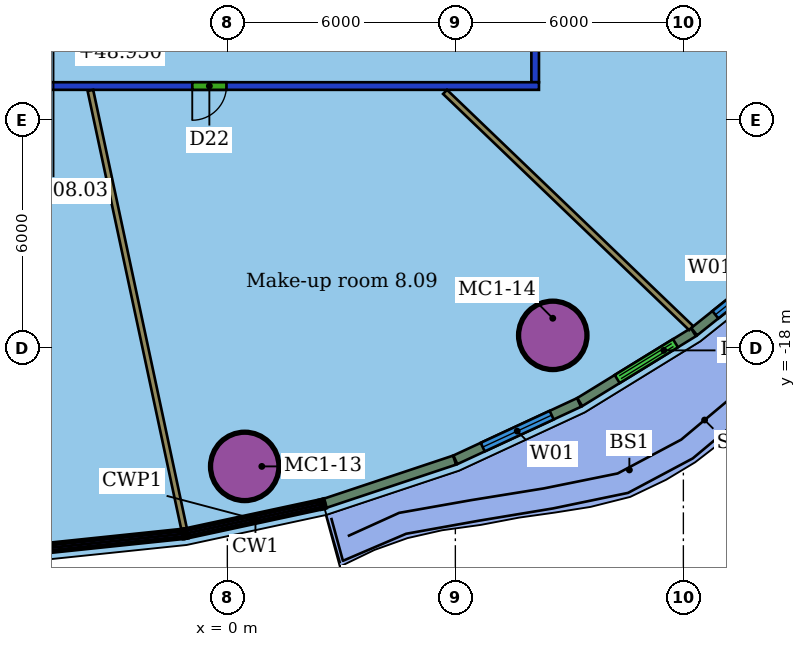
"""IFC4 building model, lengths in metres.
Left out: names, types, materials, properties, quantities, classifications, styles, units other than length and angle.
Written with IfcOpenShell. Run it as: python <this file> out.ifc"""

import sys

from ifc_helpers import new_model, si_unit, direction, frame, frame_2d, origin, origin_2d, place, context, subcontext, project, spatial, rectangle, hollow_circle, extrude, element, fill, save


model = new_model("IFC4")
c1 = context("Model", 3, precision=1e-05, world=origin(), true_north=direction((0.0, 1.0)))
c2 = subcontext(c1, "Body", "Model", "MODEL_VIEW")
j1 = project(units=[si_unit("LENGTHUNIT", "METRE"), si_unit("PLANEANGLEUNIT", "RADIAN")], contexts=[c1])
p1 = place(None, origin())
s1 = spatial("IfcSite", under=j1, at=p1, CompositionType="ELEMENT")
p2 = place(p1, origin())
s2 = spatial("IfcBuilding", under=s1, at=p2, CompositionType="ELEMENT")
p3 = place(p2, frame((0.0, 0.0, 47.1)))
s3 = spatial("IfcBuildingStorey", under=s2, at=p3, CompositionType="ELEMENT", Elevation=47.1)
for number, where, z_axis, x_axis in (
    (1, (0.458, -21.108, 0.0), (0.0, 0.0, 1.0), (1.0, 0.0, 0.0)),
    (2, (8.563, -17.66, 0.0), (0.0, 0.0, 1.0), (1.0, 0.0, 0.0)),
):
    element("IfcColumn", number, at=place(p3, frame(where, z_axis=z_axis, x_axis=x_axis)), inside=s3, PredefinedType="COLUMN", context=c2, shape_type="SweptSolid", body=[
        extrude(hollow_circle(Radius=0.9, WallThickness=0.06, at=origin_2d()), origin(), (0.0, 0.0, 1.0), 3.55),
    ])
p4 = place(p3, frame((8.2, -11.1, 0.0), z_axis=(0.0, 0.0, 1.0), x_axis=(-1.0, 0.0, 0.0)))
e3 = element("IfcWall", 3, at=p4, inside=s3, PredefinedType="PARTITIONING", context=c2, shape_type="SweptSolid", body=[
    extrude(rectangle(XDim=28.4, YDim=0.2, at=frame_2d((14.2, 0.0))), origin(), (0.0, 0.0, 1.0), 2.85),
])
p5 = place(p4, frame((25.038, 0.0, 0.0)))
e4 = element("IfcOpeningElement", 4, at=p5, cuts=e3, PredefinedType="OPENING", context=c2, shape_type="SweptSolid", body=[
    extrude(rectangle(XDim=1.0, YDim=2.1, at=frame_2d((0.5, 1.05))), frame((0.0, 0.11, 0.0), z_axis=(0.0, -1.0, 0.0), x_axis=(1.0, 0.0, 0.0)), (0.0, 0.0, 1.0), 0.22),
])
p6 = place(p4, frame((18.73, 0.0, 0.0)))
e5 = element("IfcOpeningElement", 5, at=p6, cuts=e3, PredefinedType="OPENING", context=c2, shape_type="SweptSolid", body=[
    extrude(rectangle(XDim=1.8, YDim=2.1, at=frame_2d((0.9, 1.05))), frame((0.0, 0.11, 0.0), z_axis=(0.0, -1.0, 0.0), x_axis=(1.0, 0.0, 0.0)), (0.0, 0.0, 1.0), 0.22),
])
p7 = place(p4, frame((8.223, 0.0, 0.0)))
e6 = element("IfcOpeningElement", 6, at=p7, cuts=e3, PredefinedType="OPENING", context=c2, shape_type="SweptSolid", body=[
    extrude(rectangle(XDim=0.9, YDim=2.1, at=frame_2d((0.45, 1.05))), frame((0.0, 0.11, 0.0), z_axis=(0.0, -1.0, 0.0), x_axis=(1.0, 0.0, 0.0)), (0.0, 0.0, 1.0), 0.22),
])
p8 = place(p3, frame((8.1, 11.0, 0.0), z_axis=(0.0, 0.0, 1.0), x_axis=(0.0, -1.0, 0.0)))
e7 = element("IfcWall", 7, at=p8, inside=s3, PredefinedType="PARTITIONING", context=c2, shape_type="SweptSolid", body=[
    extrude(rectangle(XDim=22.0, YDim=0.2, at=frame_2d((11.0, 0.0))), origin(), (0.0, 0.0, 1.0), 2.85),
])
p9 = place(p8, frame((2.753, 0.0, 0.0)))
e8 = element("IfcOpeningElement", 8, at=p9, cuts=e7, PredefinedType="OPENING", context=c2, shape_type="SweptSolid", body=[
    extrude(rectangle(XDim=1.1, YDim=2.1, at=frame_2d((0.55, 1.05))), frame((0.0, 0.11, 0.0), z_axis=(0.0, -1.0, 0.0), x_axis=(1.0, 0.0, 0.0)), (0.0, 0.0, 1.0), 0.22),
])
p10 = place(p8, frame((15.639, 0.0, 0.0)))
e9 = element("IfcOpeningElement", 9, at=p10, cuts=e7, PredefinedType="OPENING", context=c2, shape_type="SweptSolid", body=[
    extrude(rectangle(XDim=1.8, YDim=2.1, at=frame_2d((0.9, 1.05))), frame((0.0, 0.11, 0.0), z_axis=(0.0, -1.0, 0.0), x_axis=(1.0, 0.0, 0.0)), (0.0, 0.0, 1.0), 0.22),
])
p11 = place(p8, frame((7.72, 0.0, 0.0)))
e10 = element("IfcOpeningElement", 10, at=p11, cuts=e7, PredefinedType="OPENING", context=c2, shape_type="SweptSolid", body=[
    extrude(rectangle(XDim=0.9, YDim=2.1, at=frame_2d((0.45, 1.05))), frame((0.0, 0.11, 0.0), z_axis=(0.0, -1.0, 0.0), x_axis=(1.0, 0.0, 0.0)), (0.0, 0.0, 1.0), 0.22),
])
p12 = place(p3, frame((-1.138, -22.756, 0.0), z_axis=(0.0, 0.0, 1.0), x_axis=(-0.208954012669, 0.977925467809, 0.0)))
e11 = element("IfcWall", 11, at=p12, inside=s3, PredefinedType="PARTITIONING", context=c2, shape_type="SweptSolid", body=[
    extrude(rectangle(XDim=11.801, YDim=0.15, at=frame_2d((5.9, 0.0))), origin(), (0.0, 0.0, 1.0), 3.55),
])
p13 = place(p3, frame((12.204, -17.468, 0.0), z_axis=(0.0, 0.0, 1.0), x_axis=(-0.721538439263, 0.692374378978, 0.0)))
e12 = element("IfcWall", 12, at=p13, inside=s3, PredefinedType="PARTITIONING", context=c2, shape_type="SweptSolid", body=[
    extrude(rectangle(XDim=8.974, YDim=0.15, at=frame_2d((4.487, 0.0))), origin(), (0.0, 0.0, 1.0), 3.55),
])
p14 = place(p3, frame((2.562, -22.082, 0.0), z_axis=(0.0, 0.0, 1.0), x_axis=(0.948744266755, 0.316044801096, 0.0)))
e13 = element("IfcWall", 13, at=p14, inside=s3, PredefinedType="SOLIDWALL", context=c2, shape_type="SweptSolid", body=[
    extrude(rectangle(XDim=3.603, YDim=0.25, at=frame_2d((1.801, 0.0))), origin(), (0.0, 0.0, 1.0), 3.15),
])
p15 = place(p3, frame((6.0, -20.935, 0.0), z_axis=(0.0, 0.0, 1.0), x_axis=(0.90717882077, 0.420745275845, 0.0)))
e14 = element("IfcWall", 14, at=p15, inside=s3, PredefinedType="SOLIDWALL", context=c2, shape_type="SweptSolid", body=[
    extrude(rectangle(XDim=3.587, YDim=0.25, at=frame_2d((1.793, 0.0))), origin(), (0.0, 0.0, 1.0), 3.15),
])
p16 = place(p15, frame((0.793, 0.0, 0.8)))
e15 = element("IfcOpeningElement", 15, at=p16, cuts=e14, PredefinedType="OPENING", context=c2, shape_type="SweptSolid", body=[
    extrude(rectangle(XDim=2.0, YDim=2.2, at=frame_2d((1.0, 1.1))), frame((0.0, 0.135, 0.0), z_axis=(0.0, -1.0, 0.0), x_axis=(1.0, 0.0, 0.0)), (0.0, 0.0, 1.0), 0.27),
])
p17 = place(p3, frame((9.274, -19.415, 0.0), z_axis=(0.0, 0.0, 1.0), x_axis=(0.851885012521, 0.523728866344, 0.0)))
e16 = element("IfcWall", 16, at=p17, inside=s3, PredefinedType="SOLIDWALL", context=c2, shape_type="SweptSolid", body=[
    extrude(rectangle(XDim=3.511, YDim=0.25, at=frame_2d((1.756, 0.0))), origin(), (0.0, 0.0, 1.0), 3.15),
])
p18 = place(p17, frame((1.156, 0.0, 0.0)))
e17 = element("IfcOpeningElement", 17, at=p18, cuts=e16, PredefinedType="OPENING", context=c2, shape_type="SweptSolid", body=[
    extrude(rectangle(XDim=1.8, YDim=2.4, at=frame_2d((0.9, 1.2))), frame((0.0, 0.135, 0.0), z_axis=(0.0, -1.0, 0.0), x_axis=(1.0, 0.0, 0.0)), (0.0, 0.0, 1.0), 0.27),
])
p19 = place(p3, frame((12.284, -17.562, 0.0), z_axis=(0.0, 0.0, 1.0), x_axis=(0.78173709479, 0.623608141888, 0.0)))
e18 = element("IfcWall", 18, at=p19, inside=s3, PredefinedType="SOLIDWALL", context=c2, shape_type="SweptSolid", body=[
    extrude(rectangle(XDim=3.426, YDim=0.25, at=frame_2d((1.713, 0.0))), origin(), (0.0, 0.0, 1.0), 3.15),
])
p20 = place(p19, frame((0.713, 0.0, 0.8)))
e19 = element("IfcOpeningElement", 19, at=p20, cuts=e18, PredefinedType="OPENING", context=c2, shape_type="SweptSolid", body=[
    extrude(rectangle(XDim=2.0, YDim=2.2, at=frame_2d((1.0, 1.1))), frame((0.0, 0.135, 0.0), z_axis=(0.0, -1.0, 0.0), x_axis=(1.0, 0.0, 0.0)), (0.0, 0.0, 1.0), 0.27),
])
p21 = place(p7, origin())
e20 = element("IfcDoor", 20, at=p21, inside=s3, OperationType="SINGLE_SWING_RIGHT", PredefinedType="DOOR", context=c2, shape_type="SweptSolid", body=[
    extrude(rectangle(XDim=0.9, YDim=2.1, at=frame_2d((0.45, 1.05))), frame((0.0, 0.025, 0.0), z_axis=(0.0, -1.0, 0.0), x_axis=(1.0, 0.0, 0.0)), (0.0, 0.0, 1.0), 0.05),
])
fill(e6, e20)
p22 = place(p16, origin())
e21 = element("IfcWindow", 21, at=p22, inside=s3, PartitioningType="SINGLE_PANEL", PredefinedType="WINDOW", context=c2, shape_type="SweptSolid", body=[
    extrude(rectangle(XDim=2.0, YDim=2.2, at=frame_2d((1.0, 1.1))), frame((0.0, 0.03, 0.0), z_axis=(0.0, -1.0, 0.0), x_axis=(1.0, 0.0, 0.0)), (0.0, 0.0, 1.0), 0.06),
])
fill(e15, e21)
p23 = place(p18, origin())
e22 = element("IfcDoor", 22, at=p23, inside=s3, OperationType="DOUBLE_DOOR_SLIDING", PredefinedType="DOOR", context=c2, shape_type="SweptSolid", body=[
    extrude(rectangle(XDim=1.8, YDim=2.4, at=frame_2d((0.9, 1.2))), frame((0.0, 0.025, 0.0), z_axis=(0.0, -1.0, 0.0), x_axis=(1.0, 0.0, 0.0)), (0.0, 0.0, 1.0), 0.05),
])
fill(e17, e22)
p24 = place(p20, origin())
e23 = element("IfcWindow", 23, at=p24, inside=s3, PartitioningType="SINGLE_PANEL", PredefinedType="WINDOW", context=c2, shape_type="SweptSolid", body=[
    extrude(rectangle(XDim=2.0, YDim=2.2, at=frame_2d((1.0, 1.1))), frame((0.0, 0.03, 0.0), z_axis=(0.0, -1.0, 0.0), x_axis=(1.0, 0.0, 0.0)), (0.0, 0.0, 1.0), 0.06),
])
fill(e19, e23)
save(model, sys.argv[1])
